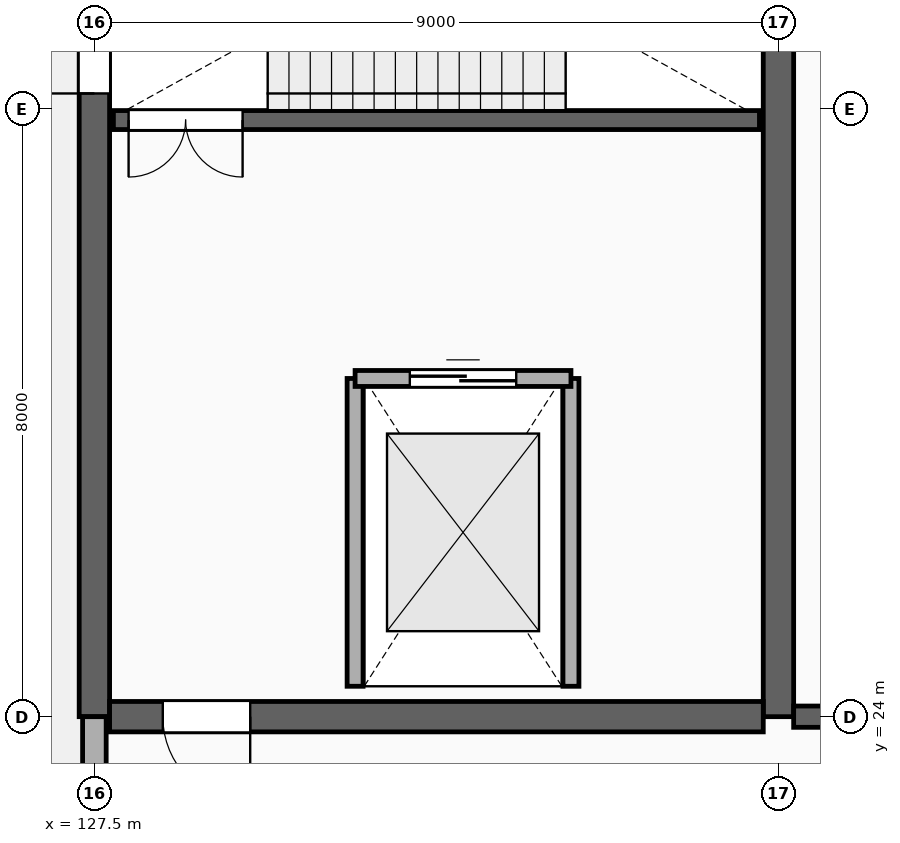
"""IFC4 building model, lengths in metres.
Left out: names, types, materials, properties, quantities, classifications, styles, units other than length and angle.
Written with IfcOpenShell. Run it as: python <this file> out.ifc"""

import sys

from ifc_helpers import new_model, si_unit, direction, frame, frame_2d, origin, place, context, subcontext, project, spatial, rectangle, extrude, element, fill, save


model = new_model("IFC4")
c1 = context("Model", 3, precision=1e-05, world=origin(), true_north=direction((0.0, 1.0)))
c2 = subcontext(c1, "Body", "Model", "MODEL_VIEW")
j1 = project(units=[si_unit("LENGTHUNIT", "METRE"), si_unit("PLANEANGLEUNIT", "RADIAN")], contexts=[c1])
p1 = place(None, origin())
s1 = spatial("IfcSite", under=j1, at=p1, CompositionType="ELEMENT")
p2 = place(p1, origin())
s2 = spatial("IfcBuilding", under=s1, at=p2, CompositionType="ELEMENT")
p3 = place(p2, origin())
s3 = spatial("IfcBuildingStorey", under=s2, at=p3, CompositionType="ELEMENT", Elevation=0.0)
p4 = place(p3, frame((127.5, 24.0, 0.0), z_axis=(0.0, 0.0, 1.0), x_axis=(0.0, 1.0, 0.0)))
e1 = element("IfcWall", 1, at=p4, inside=s3, PredefinedType="SHEAR", context=c2, shape_type="SweptSolid", body=[
    extrude(rectangle(XDim=12.8, YDim=0.4, at=frame_2d((6.4, 0.0))), origin(), (0.0, 0.0, 1.0), 5.24),
])
p5 = place(p4, frame((8.2, 0.0, 0.0)))
e2 = element("IfcOpeningElement", 2, at=p5, cuts=e1, PredefinedType="OPENING", context=c2, shape_type="SweptSolid", body=[
    extrude(rectangle(XDim=1.8, YDim=2.3, at=frame_2d((0.9, 1.15))), frame((0.0, 0.212, 0.0), z_axis=(0.0, -1.0, 0.0), x_axis=(1.0, 0.0, 0.0)), (0.0, 0.0, 1.0), 0.424),
])
p6 = place(p3, frame((136.5, 24.0, 0.0), z_axis=(0.0, 0.0, 1.0), x_axis=(0.0, 1.0, 0.0)))
e3 = element("IfcWall", 3, at=p6, inside=s3, PredefinedType="SHEAR", context=c2, shape_type="SweptSolid", body=[
    extrude(rectangle(XDim=12.8, YDim=0.4, at=frame_2d((6.4, 0.0))), origin(), (0.0, 0.0, 1.0), 5.24),
])
p7 = place(p3, frame((127.7, 24.0, 0.0), z_axis=(0.0, 0.0, 1.0), x_axis=(1.0, 0.0, 0.0)))
e4 = element("IfcWall", 4, at=p7, inside=s3, PredefinedType="SHEAR", context=c2, shape_type="SweptSolid", body=[
    extrude(rectangle(XDim=8.6, YDim=0.4, at=frame_2d((4.3, 0.0))), origin(), (0.0, 0.0, 1.0), 5.24),
])
p8 = place(p7, frame((0.7, 0.0, 0.0)))
e5 = element("IfcOpeningElement", 5, at=p8, cuts=e4, PredefinedType="OPENING", context=c2, shape_type="SweptSolid", body=[
    extrude(rectangle(XDim=1.15, YDim=2.2, at=frame_2d((0.575, 1.1))), frame((0.0, 0.212, 0.0), z_axis=(0.0, -1.0, 0.0), x_axis=(1.0, 0.0, 0.0)), (0.0, 0.0, 1.0), 0.424),
])
p9 = place(p3, frame((127.75, 31.85, 0.0), z_axis=(0.0, 0.0, 1.0), x_axis=(1.0, 0.0, 0.0)))
e6 = element("IfcWall", 6, at=p9, inside=s3, PredefinedType="STANDARD", context=c2, shape_type="SweptSolid", body=[
    extrude(rectangle(XDim=8.5, YDim=0.25, at=frame_2d((4.25, 0.0))), origin(), (0.0, 0.0, 1.0), 5.24),
])
p10 = place(p9, frame((0.2, 0.0, 0.0)))
e7 = element("IfcOpeningElement", 7, at=p10, cuts=e6, PredefinedType="OPENING", context=c2, shape_type="SweptSolid", body=[
    extrude(rectangle(XDim=1.5, YDim=2.2, at=frame_2d((0.75, 1.1))), frame((0.0, 0.137, 0.0), z_axis=(0.0, -1.0, 0.0), x_axis=(1.0, 0.0, 0.0)), (0.0, 0.0, 1.0), 0.274),
])
for number, where, z_axis, x_axis in (
    (8, (130.93, 24.4, 0.0), (0.0, 0.0, 1.0), (0.0, 1.0, 0.0)),
    (9, (133.77, 24.4, 0.0), (0.0, 0.0, 1.0), (0.0, 1.0, 0.0)),
):
    element("IfcWall", number, at=place(p3, frame(where, z_axis=z_axis, x_axis=x_axis)), inside=s3, PredefinedType="PARTITIONING", context=c2, shape_type="SweptSolid", body=[
        extrude(rectangle(XDim=4.05, YDim=0.21, at=frame_2d((2.025, 0.0))), origin(), (0.0, 0.0, 1.0), 5.24),
    ])
p11 = place(p3, frame((130.93, 28.45, 0.0), z_axis=(0.0, 0.0, 1.0), x_axis=(1.0, 0.0, 0.0)))
e10 = element("IfcWall", 10, at=p11, inside=s3, PredefinedType="PARTITIONING", context=c2, shape_type="SweptSolid", body=[
    extrude(rectangle(XDim=2.84, YDim=0.21, at=frame_2d((1.42, 0.0))), origin(), (0.0, 0.0, 1.0), 5.24),
])
p12 = place(p11, frame((0.72, 0.0, 0.0)))
e11 = element("IfcOpeningElement", 11, at=p12, cuts=e10, PredefinedType="OPENING", context=c2, shape_type="SweptSolid", body=[
    extrude(rectangle(XDim=1.4, YDim=2.35, at=frame_2d((0.7, 1.175))), frame((0.0, 0.117, 0.0), z_axis=(0.0, -1.0, 0.0), x_axis=(1.0, 0.0, 0.0)), (0.0, 0.0, 1.0), 0.234),
])
p13 = place(p3, frame((127.5, 11.96, 0.0), z_axis=(0.0, 0.0, 1.0), x_axis=(0.0, 1.0, 0.0)))
e12 = element("IfcWall", 12, at=p13, inside=s3, PredefinedType="STANDARD", context=c2, shape_type="SweptSolid", body=[
    extrude(rectangle(XDim=12.04, YDim=0.31, at=frame_2d((6.02, 0.0))), origin(), (0.0, 0.0, 1.0), 4.3),
])
p14 = place(p13, frame((2.04, 0.0, 0.0)))
e13 = element("IfcOpeningElement", 13, at=p14, cuts=e12, PredefinedType="OPENING", context=c2, shape_type="SweptSolid", body=[
    extrude(rectangle(XDim=2.0, YDim=2.4, at=frame_2d((1.0, 1.2))), frame((0.0, 0.167, 0.0), z_axis=(0.0, -1.0, 0.0), x_axis=(1.0, 0.0, 0.0)), (0.0, 0.0, 1.0), 0.334),
])
p15 = place(p13, frame((8.43, 0.0, 1.2)))
e14 = element("IfcOpeningElement", 14, at=p15, cuts=e12, PredefinedType="OPENING", context=c2, shape_type="SweptSolid", body=[
    extrude(rectangle(XDim=1.2, YDim=2.2, at=frame_2d((0.6, 1.1))), frame((0.0, 0.167, 0.0), z_axis=(0.0, -1.0, 0.0), x_axis=(1.0, 0.0, 0.0)), (0.0, 0.0, 1.0), 0.334),
])
p16 = place(p3, frame((136.7, 24.0, 0.0), z_axis=(0.0, 0.0, 1.0), x_axis=(1.0, 0.0, 0.0)))
e15 = element("IfcWall", 15, at=p16, inside=s3, PredefinedType="STANDARD", context=c2, shape_type="SweptSolid", body=[
    extrude(rectangle(XDim=26.9, YDim=0.28, at=frame_2d((13.45, 0.0))), origin(), (0.0, 0.0, 1.0), 5.1),
])
p17 = place(p16, frame((3.5, 0.0, 0.0)))
e16 = element("IfcOpeningElement", 16, at=p17, cuts=e15, PredefinedType="OPENING", context=c2, shape_type="SweptSolid", body=[
    extrude(rectangle(XDim=1.6, YDim=2.4, at=frame_2d((0.8, 1.2))), frame((0.0, 0.152, 0.0), z_axis=(0.0, -1.0, 0.0), x_axis=(1.0, 0.0, 0.0)), (0.0, 0.0, 1.0), 0.304),
])
p18 = place(p16, frame((17.5, 0.0, 0.0)))
e17 = element("IfcOpeningElement", 17, at=p18, cuts=e15, PredefinedType="OPENING", context=c2, shape_type="SweptSolid", body=[
    extrude(rectangle(XDim=1.25, YDim=2.25, at=frame_2d((0.625, 1.125))), frame((0.0, 0.152, 0.0), z_axis=(0.0, -1.0, 0.0), x_axis=(1.0, 0.0, 0.0)), (0.0, 0.0, 1.0), 0.304),
])
p19 = place(p5, origin())
e18 = element("IfcDoor", 18, at=p19, inside=s3, OperationType="DOUBLE_DOOR_SINGLE_SWING", PredefinedType="DOOR", context=c2, shape_type="SweptSolid", body=[
    extrude(rectangle(XDim=1.8, YDim=2.3, at=frame_2d((0.9, 1.15))), frame((0.0, 0.025, 0.0), z_axis=(0.0, -1.0, 0.0), x_axis=(1.0, 0.0, 0.0)), (0.0, 0.0, 1.0), 0.05),
])
fill(e2, e18)
p20 = place(p10, frame((1.5, 0.0, 0.0), z_axis=(0.0, 0.0, 1.0), x_axis=(-1.0, 0.0, 0.0)))
e19 = element("IfcDoor", 19, at=p20, inside=s3, OperationType="DOUBLE_DOOR_SINGLE_SWING", PredefinedType="DOOR", context=c2, shape_type="SweptSolid", body=[
    extrude(rectangle(XDim=1.5, YDim=2.2, at=frame_2d((0.75, 1.1))), frame((0.0, 0.025, 0.0), z_axis=(0.0, -1.0, 0.0), x_axis=(1.0, 0.0, 0.0)), (0.0, 0.0, 1.0), 0.05),
])
fill(e7, e19)
p21 = place(p12, origin())
e20 = element("IfcDoor", 20, at=p21, inside=s3, OperationType="DOUBLE_DOOR_SLIDING", PredefinedType="DOOR", context=c2, shape_type="SweptSolid", body=[
    extrude(rectangle(XDim=1.4, YDim=2.35, at=frame_2d((0.7, 1.175))), frame((0.0, 0.025, 0.0), z_axis=(0.0, -1.0, 0.0), x_axis=(1.0, 0.0, 0.0)), (0.0, 0.0, 1.0), 0.05),
])
fill(e11, e20)
p22 = place(p8, frame((1.15, 0.0, 0.0), z_axis=(0.0, 0.0, 1.0), x_axis=(-1.0, 0.0, 0.0)))
e21 = element("IfcDoor", 21, at=p22, inside=s3, OperationType="SINGLE_SWING_RIGHT", PredefinedType="DOOR", context=c2, shape_type="SweptSolid", body=[
    extrude(rectangle(XDim=1.15, YDim=2.2, at=frame_2d((0.575, 1.1))), frame((0.0, 0.025, 0.0), z_axis=(0.0, -1.0, 0.0), x_axis=(1.0, 0.0, 0.0)), (0.0, 0.0, 1.0), 0.05),
])
fill(e5, e21)
save(model, sys.argv[1])
